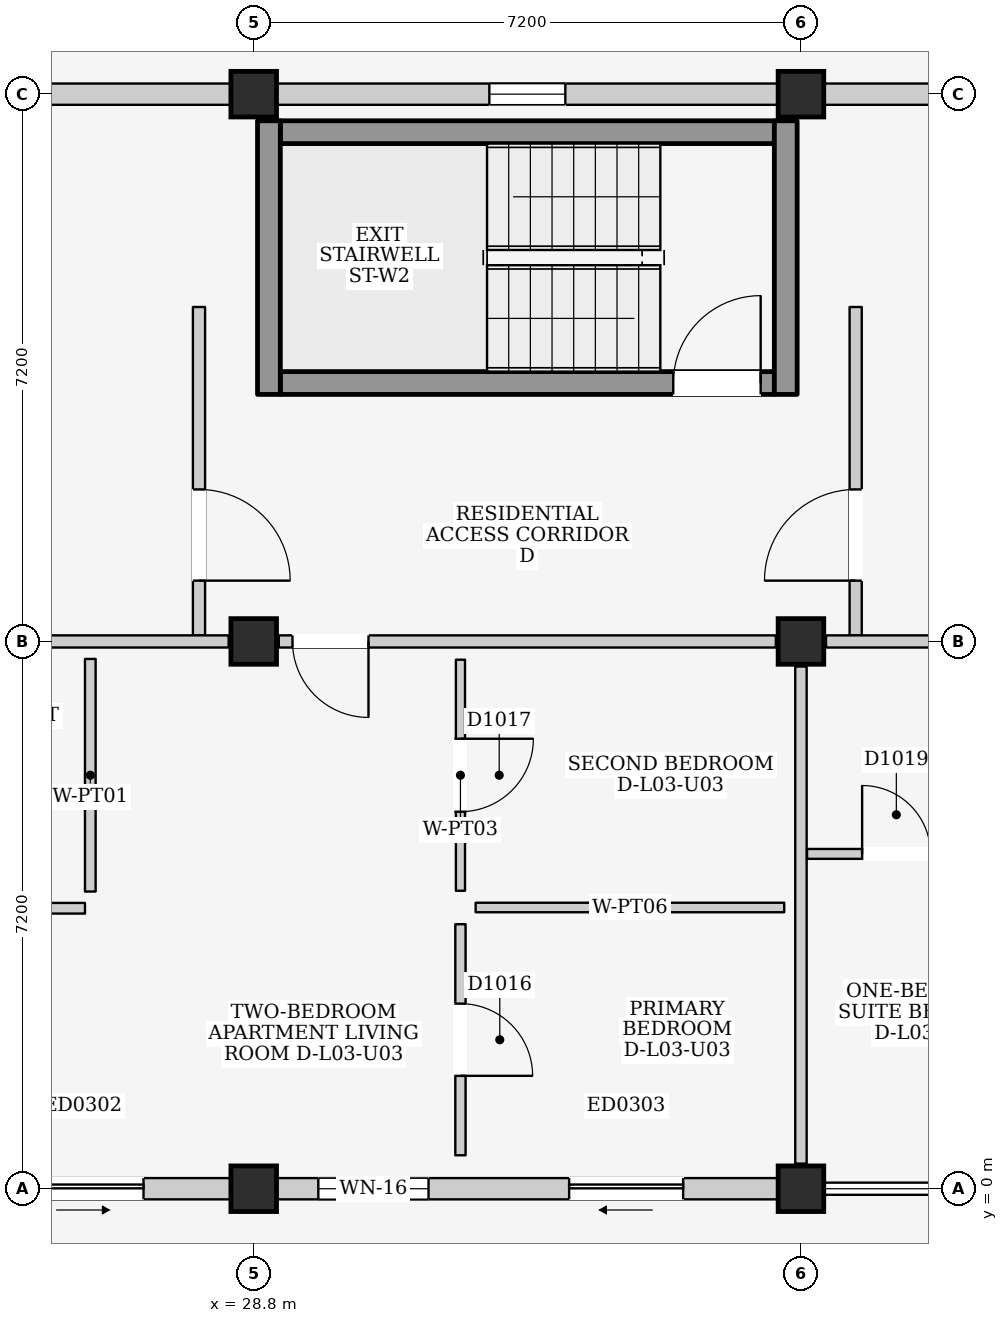
"""IFC4 building model, lengths in metres.
Left out: names, types, materials, properties, quantities, classifications, styles, units other than length and angle.
Written with IfcOpenShell. Run it as: python <this file> out.ifc"""

import sys

from ifc_helpers import new_model, si_unit, direction, frame, frame_2d, origin, origin_2d, place, context, subcontext, project, spatial, rectangle, extrude, element, fill, save


model = new_model("IFC4")
c1 = context("Model", 3, precision=1e-05, world=origin(), true_north=direction((0.0, 1.0)))
c2 = subcontext(c1, "Body", "Model", "MODEL_VIEW")
j1 = project(units=[si_unit("LENGTHUNIT", "METRE"), si_unit("PLANEANGLEUNIT", "RADIAN")], contexts=[c1])
p1 = place(None, origin())
s1 = spatial("IfcSite", under=j1, at=p1, CompositionType="ELEMENT")
p2 = place(p1, origin())
s2 = spatial("IfcBuilding", under=s1, at=p2, CompositionType="ELEMENT")
p3 = place(p2, frame((0.0, 0.0, 12.2)))
s3 = spatial("IfcBuildingStorey", under=s2, at=p3, CompositionType="ELEMENT", Elevation=12.2)
for number, where, z_axis, x_axis in (
    (1, (28.8, 0.0, 0.0), (0.0, 0.0, 1.0), (1.0, 0.0, 0.0)),
    (2, (28.8, 7.2, 0.0), (0.0, 0.0, 1.0), (1.0, 0.0, 0.0)),
    (3, (28.8, 14.4, 0.0), (0.0, 0.0, 1.0), (1.0, 0.0, 0.0)),
    (4, (36.0, 0.0, 0.0), (0.0, 0.0, 1.0), (1.0, 0.0, 0.0)),
    (5, (36.0, 7.2, 0.0), (0.0, 0.0, 1.0), (1.0, 0.0, 0.0)),
    (6, (36.0, 14.4, 0.0), (0.0, 0.0, 1.0), (1.0, 0.0, 0.0)),
):
    element("IfcColumn", number, at=place(p3, frame(where, z_axis=z_axis, x_axis=x_axis)), inside=s3, PredefinedType="COLUMN", context=c2, shape_type="SweptSolid", body=[
        extrude(rectangle(XDim=0.6, YDim=0.6, at=origin_2d()), origin(), (0.0, 0.0, 1.0), 3.2),
    ])
p4 = place(p3, frame((21.9, 0.0, 0.0), z_axis=(0.0, 0.0, 1.0), x_axis=(1.0, 0.0, 0.0)))
e7 = element("IfcWall", 7, at=p4, inside=s3, PredefinedType="ELEMENTEDWALL", context=c2, shape_type="SweptSolid", body=[
    extrude(rectangle(XDim=6.6, YDim=0.28, at=frame_2d((3.3, 0.0))), origin(), (0.0, 0.0, 1.0), 2.445),
])
p5 = place(p4, frame((3.85, 0.0, 0.0)))
e8 = element("IfcOpeningElement", 8, at=p5, cuts=e7, PredefinedType="OPENING", context=c2, shape_type="SweptSolid", body=[
    extrude(rectangle(XDim=1.6, YDim=2.12, at=frame_2d((0.8, 1.06))), frame((0.0, 0.155, 0.0), z_axis=(0.0, -1.0, 0.0), x_axis=(1.0, 0.0, 0.0)), (0.0, 0.0, 1.0), 0.31),
])
p6 = place(p4, frame((0.55, 0.0, 0.885)))
e9 = element("IfcOpeningElement", 9, at=p6, cuts=e7, PredefinedType="OPENING", context=c2, shape_type="SweptSolid", body=[
    extrude(rectangle(XDim=1.7, YDim=1.45, at=frame_2d((0.85, 0.725))), frame((0.0, 0.155, 0.0), z_axis=(0.0, -1.0, 0.0), x_axis=(1.0, 0.0, 0.0)), (0.0, 0.0, 1.0), 0.31),
])
p7 = place(p3, frame((21.9, 14.4, 0.0), z_axis=(0.0, 0.0, 1.0), x_axis=(1.0, 0.0, 0.0)))
e10 = element("IfcWall", 10, at=p7, inside=s3, PredefinedType="ELEMENTEDWALL", context=c2, shape_type="SweptSolid", body=[
    extrude(rectangle(XDim=6.6, YDim=0.28, at=frame_2d((3.3, 0.0))), origin(), (0.0, 0.0, 1.0), 2.365),
])
p8 = place(p7, frame((2.8, 0.0, 1.2)))
e11 = element("IfcOpeningElement", 11, at=p8, cuts=e10, PredefinedType="OPENING", context=c2, shape_type="SweptSolid", body=[
    extrude(rectangle(XDim=1.0, YDim=0.9, at=frame_2d((0.5, 0.45))), frame((0.0, 0.155, 0.0), z_axis=(0.0, -1.0, 0.0), x_axis=(1.0, 0.0, 0.0)), (0.0, 0.0, 1.0), 0.31),
])
p9 = place(p3, frame((29.1, 0.0, 0.0), z_axis=(0.0, 0.0, 1.0), x_axis=(1.0, 0.0, 0.0)))
e12 = element("IfcWall", 12, at=p9, inside=s3, PredefinedType="ELEMENTEDWALL", context=c2, shape_type="SweptSolid", body=[
    extrude(rectangle(XDim=6.6, YDim=0.28, at=frame_2d((3.3, 0.0))), origin(), (0.0, 0.0, 1.0), 2.445),
])
p10 = place(p9, frame((3.85, 0.0, 0.0)))
e13 = element("IfcOpeningElement", 13, at=p10, cuts=e12, PredefinedType="OPENING", context=c2, shape_type="SweptSolid", body=[
    extrude(rectangle(XDim=1.5, YDim=2.12, at=frame_2d((0.75, 1.06))), frame((0.0, 0.155, 0.0), z_axis=(0.0, -1.0, 0.0), x_axis=(1.0, 0.0, 0.0)), (0.0, 0.0, 1.0), 0.31),
])
p11 = place(p9, frame((0.55, 0.0, 0.9)))
e14 = element("IfcOpeningElement", 14, at=p11, cuts=e12, PredefinedType="OPENING", context=c2, shape_type="SweptSolid", body=[
    extrude(rectangle(XDim=1.45, YDim=1.4, at=frame_2d((0.725, 0.7))), frame((0.0, 0.155, 0.0), z_axis=(0.0, -1.0, 0.0), x_axis=(1.0, 0.0, 0.0)), (0.0, 0.0, 1.0), 0.31),
])
p12 = place(p3, frame((29.1, 14.4, 0.0), z_axis=(0.0, 0.0, 1.0), x_axis=(1.0, 0.0, 0.0)))
e15 = element("IfcWall", 15, at=p12, inside=s3, PredefinedType="ELEMENTEDWALL", context=c2, shape_type="SweptSolid", body=[
    extrude(rectangle(XDim=6.6, YDim=0.28, at=frame_2d((3.3, 0.0))), origin(), (0.0, 0.0, 1.0), 2.365),
])
p13 = place(p12, frame((2.8, 0.0, 1.2)))
e16 = element("IfcOpeningElement", 16, at=p13, cuts=e15, PredefinedType="OPENING", context=c2, shape_type="SweptSolid", body=[
    extrude(rectangle(XDim=1.0, YDim=0.9, at=frame_2d((0.5, 0.45))), frame((0.0, 0.155, 0.0), z_axis=(0.0, -1.0, 0.0), x_axis=(1.0, 0.0, 0.0)), (0.0, 0.0, 1.0), 0.31),
])
p14 = place(p3, frame((36.3, 14.4, 0.0), z_axis=(0.0, 0.0, 1.0), x_axis=(1.0, 0.0, 0.0)))
e17 = element("IfcWall", 17, at=p14, inside=s3, PredefinedType="ELEMENTEDWALL", context=c2, shape_type="SweptSolid", body=[
    extrude(rectangle(XDim=6.6, YDim=0.28, at=frame_2d((3.3, 0.0))), origin(), (0.0, 0.0, 1.0), 2.365),
])
p15 = place(p14, frame((2.8, 0.0, 1.2)))
e18 = element("IfcOpeningElement", 18, at=p15, cuts=e17, PredefinedType="OPENING", context=c2, shape_type="SweptSolid", body=[
    extrude(rectangle(XDim=1.0, YDim=0.9, at=frame_2d((0.5, 0.45))), frame((0.0, 0.155, 0.0), z_axis=(0.0, -1.0, 0.0), x_axis=(1.0, 0.0, 0.0)), (0.0, 0.0, 1.0), 0.31),
])
p16 = place(p3, frame((28.08, 7.28, 0.0), z_axis=(0.0, 0.0, 1.0), x_axis=(0.0, 1.0, 0.0)))
e19 = element("IfcWall", 19, at=p16, inside=s3, PredefinedType="PARTITIONING", context=c2, shape_type="SweptSolid", body=[
    extrude(rectangle(XDim=4.32, YDim=0.16, at=frame_2d((2.16, 0.0))), origin(), (0.0, 0.0, 1.0), 2.98),
])
p17 = place(p16, frame((0.72, 0.0, 0.0)))
e20 = element("IfcOpeningElement", 20, at=p17, cuts=e19, PredefinedType="OPENING", context=c2, shape_type="SweptSolid", body=[
    extrude(rectangle(XDim=1.2, YDim=2.2, at=frame_2d((0.6, 1.1))), frame((0.0, 0.095, 0.0), z_axis=(0.0, -1.0, 0.0), x_axis=(1.0, 0.0, 0.0)), (0.0, 0.0, 1.0), 0.19),
])
p18 = place(p3, frame((29.15, 10.6, 0.0), z_axis=(0.0, 0.0, 1.0), x_axis=(1.0, 0.0, 0.0)))
e21 = element("IfcWall", 21, at=p18, inside=s3, PredefinedType="SHEAR", context=c2, shape_type="SweptSolid", body=[
    extrude(rectangle(XDim=6.5, YDim=0.3, at=frame_2d((3.25, 0.0))), origin(), (0.0, 0.0, 1.0), 2.98),
])
p19 = place(p18, frame((5.17, 0.0, 0.0)))
e22 = element("IfcOpeningElement", 22, at=p19, cuts=e21, PredefinedType="OPENING", context=c2, shape_type="SweptSolid", body=[
    extrude(rectangle(XDim=1.15, YDim=2.2, at=frame_2d((0.575, 1.1))), frame((0.0, 0.165, 0.0), z_axis=(0.0, -1.0, 0.0), x_axis=(1.0, 0.0, 0.0)), (0.0, 0.0, 1.0), 0.33),
])
p20 = place(p3, frame((29.15, 13.9, 0.0), z_axis=(0.0, 0.0, 1.0), x_axis=(1.0, 0.0, 0.0)))
e23 = element("IfcWall", 23, at=p20, inside=s3, PredefinedType="SHEAR", context=c2, shape_type="SweptSolid", body=[
    extrude(rectangle(XDim=6.5, YDim=0.3, at=frame_2d((3.25, 0.0))), origin(), (0.0, 0.0, 1.0), 2.98),
])
for number, where, z_axis, x_axis in (
    (24, (29.0, 10.45, 0.0), (0.0, 0.0, 1.0), (0.0, 1.0, 0.0)),
    (25, (35.8, 10.45, 0.0), (0.0, 0.0, 1.0), (0.0, 1.0, 0.0)),
):
    element("IfcWall", number, at=place(p3, frame(where, z_axis=z_axis, x_axis=x_axis)), inside=s3, PredefinedType="SHEAR", context=c2, shape_type="SweptSolid", body=[
        extrude(rectangle(XDim=3.6, YDim=0.3, at=frame_2d((1.8, 0.0))), origin(), (0.0, 0.0, 1.0), 2.98),
    ])
p21 = place(p3, frame((36.72, 7.28, 0.0), z_axis=(0.0, 0.0, 1.0), x_axis=(0.0, 1.0, 0.0)))
e26 = element("IfcWall", 26, at=p21, inside=s3, PredefinedType="PARTITIONING", context=c2, shape_type="SweptSolid", body=[
    extrude(rectangle(XDim=4.32, YDim=0.16, at=frame_2d((2.16, 0.0))), origin(), (0.0, 0.0, 1.0), 2.98),
])
p22 = place(p21, frame((0.72, 0.0, 0.0)))
e27 = element("IfcOpeningElement", 27, at=p22, cuts=e26, PredefinedType="OPENING", context=c2, shape_type="SweptSolid", body=[
    extrude(rectangle(XDim=1.2, YDim=2.2, at=frame_2d((0.6, 1.1))), frame((0.0, 0.095, 0.0), z_axis=(0.0, -1.0, 0.0), x_axis=(1.0, 0.0, 0.0)), (0.0, 0.0, 1.0), 0.19),
])
p23 = place(p3, frame((21.93, 7.2, 0.0), z_axis=(0.0, 0.0, 1.0), x_axis=(1.0, 0.0, 0.0)))
e28 = element("IfcWall", 28, at=p23, inside=s3, PredefinedType="PARTITIONING", context=c2, shape_type="SweptSolid", body=[
    extrude(rectangle(XDim=6.54, YDim=0.16, at=frame_2d((3.27, 0.0))), origin(), (0.0, 0.0, 1.0), 2.365),
])
p24 = place(p3, frame((29.13, 7.2, 0.0), z_axis=(0.0, 0.0, 1.0), x_axis=(1.0, 0.0, 0.0)))
e29 = element("IfcWall", 29, at=p24, inside=s3, PredefinedType="PARTITIONING", context=c2, shape_type="SweptSolid", body=[
    extrude(rectangle(XDim=6.54, YDim=0.16, at=frame_2d((3.27, 0.0))), origin(), (0.0, 0.0, 1.0), 2.365),
])
p25 = place(p24, frame((0.18, 0.0, 0.0)))
e30 = element("IfcOpeningElement", 30, at=p25, cuts=e29, PredefinedType="OPENING", context=c2, shape_type="SweptSolid", body=[
    extrude(rectangle(XDim=1.0, YDim=2.15, at=frame_2d((0.5, 1.075))), frame((0.0, 0.095, 0.0), z_axis=(0.0, -1.0, 0.0), x_axis=(1.0, 0.0, 0.0)), (0.0, 0.0, 1.0), 0.19),
])
p26 = place(p3, frame((36.0, 0.33, 0.0), z_axis=(0.0, 0.0, 1.0), x_axis=(0.0, 1.0, 0.0)))
e31 = element("IfcWall", 31, at=p26, inside=s3, PredefinedType="PARTITIONING", context=c2, shape_type="SweptSolid", body=[
    extrude(rectangle(XDim=6.54, YDim=0.15, at=frame_2d((3.27, 0.0))), origin(), (0.0, 0.0, 1.0), 2.415),
])
p27 = place(p3, frame((24.2, 3.69, 0.0), z_axis=(0.0, 0.0, 1.0), x_axis=(1.0, 0.0, 0.0)))
e32 = element("IfcWall", 32, at=p27, inside=s3, PredefinedType="PARTITIONING", context=c2, shape_type="SweptSolid", body=[
    extrude(rectangle(XDim=2.38, YDim=0.14, at=frame_2d((1.19, 0.0))), origin(), (0.0, 0.0, 1.0), 2.98),
])
p28 = place(p27, frame((0.73, 0.0, 0.0)))
e33 = element("IfcOpeningElement", 33, at=p28, cuts=e32, PredefinedType="OPENING", context=c2, shape_type="SweptSolid", body=[
    extrude(rectangle(XDim=0.92, YDim=2.1, at=frame_2d((0.46, 1.05))), frame((0.0, 0.085, 0.0), z_axis=(0.0, -1.0, 0.0), x_axis=(1.0, 0.0, 0.0)), (0.0, 0.0, 1.0), 0.17),
])
p29 = place(p3, frame((26.65, 3.91, 0.0), z_axis=(0.0, 0.0, 1.0), x_axis=(0.0, 1.0, 0.0)))
e34 = element("IfcWall", 34, at=p29, inside=s3, PredefinedType="PARTITIONING", context=c2, shape_type="SweptSolid", body=[
    extrude(rectangle(XDim=3.06, YDim=0.14, at=frame_2d((1.53, 0.0))), origin(), (0.0, 0.0, 1.0), 2.98),
])
p30 = place(p3, frame((31.52, 0.44, 0.0), z_axis=(0.0, 0.0, 1.0), x_axis=(0.0, 1.0, 0.0)))
e35 = element("IfcWall", 35, at=p30, inside=s3, PredefinedType="PARTITIONING", context=c2, shape_type="SweptSolid", body=[
    extrude(rectangle(XDim=3.04, YDim=0.135, at=frame_2d((1.52, 0.0))), origin(), (0.0, 0.0, 1.0), 2.98),
])
p31 = place(p30, frame((1.045, 0.0, 0.0)))
e36 = element("IfcOpeningElement", 36, at=p31, cuts=e35, PredefinedType="OPENING", context=c2, shape_type="SweptSolid", body=[
    extrude(rectangle(XDim=0.95, YDim=2.15, at=frame_2d((0.475, 1.075))), frame((0.0, 0.083, 0.0), z_axis=(0.0, -1.0, 0.0), x_axis=(1.0, 0.0, 0.0)), (0.0, 0.0, 1.0), 0.165),
])
p32 = place(p3, frame((31.72, 3.7, 0.0), z_axis=(0.0, 0.0, 1.0), x_axis=(1.0, 0.0, 0.0)))
e37 = element("IfcWall", 37, at=p32, inside=s3, PredefinedType="PARTITIONING", context=c2, shape_type="SweptSolid", body=[
    extrude(rectangle(XDim=4.06, YDim=0.125, at=frame_2d((2.03, 0.0))), origin(), (0.0, 0.0, 1.0), 2.98),
])
p33 = place(p3, frame((31.52, 3.92, 0.0), z_axis=(0.0, 0.0, 1.0), x_axis=(0.0, 1.0, 0.0)))
e38 = element("IfcWall", 38, at=p33, inside=s3, PredefinedType="PARTITIONING", context=c2, shape_type="SweptSolid", body=[
    extrude(rectangle(XDim=3.04, YDim=0.12, at=frame_2d((1.52, 0.0))), origin(), (0.0, 0.0, 1.0), 2.98),
])
p34 = place(p33, frame((1.04, 0.0, 0.0)))
e39 = element("IfcOpeningElement", 39, at=p34, cuts=e38, PredefinedType="OPENING", context=c2, shape_type="SweptSolid", body=[
    extrude(rectangle(XDim=0.96, YDim=2.15, at=frame_2d((0.48, 1.075))), frame((0.0, 0.075, 0.0), z_axis=(0.0, -1.0, 0.0), x_axis=(1.0, 0.0, 0.0)), (0.0, 0.0, 1.0), 0.15),
])
p35 = place(p3, frame((36.33, 7.2, 0.0), z_axis=(0.0, 0.0, 1.0), x_axis=(1.0, 0.0, 0.0)))
e40 = element("IfcWall", 40, at=p35, inside=s3, PredefinedType="PARTITIONING", context=c2, shape_type="SweptSolid", body=[
    extrude(rectangle(XDim=6.54, YDim=0.16, at=frame_2d((3.27, 0.0))), origin(), (0.0, 0.0, 1.0), 2.365),
])
p36 = place(p35, frame((4.32, 0.0, 0.0)))
e41 = element("IfcOpeningElement", 41, at=p36, cuts=e40, PredefinedType="OPENING", context=c2, shape_type="SweptSolid", body=[
    extrude(rectangle(XDim=1.0, YDim=2.15, at=frame_2d((0.5, 1.075))), frame((0.0, 0.095, 0.0), z_axis=(0.0, -1.0, 0.0), x_axis=(1.0, 0.0, 0.0)), (0.0, 0.0, 1.0), 0.19),
])
p37 = place(p3, frame((36.08, 4.405, 0.0), z_axis=(0.0, 0.0, 1.0), x_axis=(1.0, 0.0, 0.0)))
e42 = element("IfcWall", 42, at=p37, inside=s3, PredefinedType="PARTITIONING", context=c2, shape_type="SweptSolid", body=[
    extrude(rectangle(XDim=2.35, YDim=0.13, at=frame_2d((1.175, 0.0))), origin(), (0.0, 0.0, 1.0), 2.98),
])
p38 = place(p37, frame((0.725, 0.0, 0.0)))
e43 = element("IfcOpeningElement", 43, at=p38, cuts=e42, PredefinedType="OPENING", context=c2, shape_type="SweptSolid", body=[
    extrude(rectangle(XDim=0.9, YDim=2.1, at=frame_2d((0.45, 1.05))), frame((0.0, 0.08, 0.0), z_axis=(0.0, -1.0, 0.0), x_axis=(1.0, 0.0, 0.0)), (0.0, 0.0, 1.0), 0.16),
])
p39 = place(p5, frame((1.6, 0.0, 0.0), z_axis=(0.0, 0.0, 1.0), x_axis=(-1.0, 0.0, 0.0)))
e44 = element("IfcDoor", 44, at=p39, inside=s3, OperationType="SLIDING_TO_RIGHT", PredefinedType="DOOR", context=c2, shape_type="SweptSolid", body=[
    extrude(rectangle(XDim=1.6, YDim=2.12, at=frame_2d((0.8, 1.06))), frame((0.0, 0.025, 0.0), z_axis=(0.0, -1.0, 0.0), x_axis=(1.0, 0.0, 0.0)), (0.0, 0.0, 1.0), 0.05),
])
fill(e8, e44)
p40 = place(p10, frame((1.5, 0.0, 0.0), z_axis=(0.0, 0.0, 1.0), x_axis=(-1.0, 0.0, 0.0)))
e45 = element("IfcDoor", 45, at=p40, inside=s3, OperationType="SLIDING_TO_LEFT", PredefinedType="DOOR", context=c2, shape_type="SweptSolid", body=[
    extrude(rectangle(XDim=1.5, YDim=2.12, at=frame_2d((0.75, 1.06))), frame((0.0, 0.025, 0.0), z_axis=(0.0, -1.0, 0.0), x_axis=(1.0, 0.0, 0.0)), (0.0, 0.0, 1.0), 0.05),
])
fill(e13, e45)
p41 = place(p11, origin())
e46 = element("IfcWindow", 46, at=p41, inside=s3, PartitioningType="DOUBLE_PANEL_VERTICAL", PredefinedType="WINDOW", context=c2, shape_type="SweptSolid", body=[
    extrude(rectangle(XDim=1.45, YDim=1.4, at=frame_2d((0.725, 0.7))), frame((0.0, 0.03, 0.0), z_axis=(0.0, -1.0, 0.0), x_axis=(1.0, 0.0, 0.0)), (0.0, 0.0, 1.0), 0.06),
])
fill(e14, e46)
p42 = place(p13, origin())
e47 = element("IfcWindow", 47, at=p42, inside=s3, PartitioningType="SINGLE_PANEL", PredefinedType="WINDOW", context=c2, shape_type="SweptSolid", body=[
    extrude(rectangle(XDim=1.0, YDim=0.9, at=frame_2d((0.5, 0.45))), frame((0.0, 0.03, 0.0), z_axis=(0.0, -1.0, 0.0), x_axis=(1.0, 0.0, 0.0)), (0.0, 0.0, 1.0), 0.06),
])
fill(e16, e47)
p43 = place(p17, frame((1.2, 0.0, 0.0), z_axis=(0.0, 0.0, 1.0), x_axis=(-1.0, 0.0, 0.0)))
e48 = element("IfcDoor", 48, at=p43, inside=s3, OperationType="SINGLE_SWING_RIGHT", PredefinedType="DOOR", context=c2, shape_type="SweptSolid", body=[
    extrude(rectangle(XDim=1.2, YDim=2.2, at=frame_2d((0.6, 1.1))), frame((0.0, 0.025, 0.0), z_axis=(0.0, -1.0, 0.0), x_axis=(1.0, 0.0, 0.0)), (0.0, 0.0, 1.0), 0.05),
])
fill(e20, e48)
p44 = place(p19, origin())
e49 = element("IfcDoor", 49, at=p44, inside=s3, OperationType="SINGLE_SWING_RIGHT", PredefinedType="DOOR", context=c2, shape_type="SweptSolid", body=[
    extrude(rectangle(XDim=1.15, YDim=2.2, at=frame_2d((0.575, 1.1))), frame((0.0, 0.025, 0.0), z_axis=(0.0, -1.0, 0.0), x_axis=(1.0, 0.0, 0.0)), (0.0, 0.0, 1.0), 0.05),
])
fill(e22, e49)
p45 = place(p22, origin())
e50 = element("IfcDoor", 50, at=p45, inside=s3, OperationType="SINGLE_SWING_LEFT", PredefinedType="DOOR", context=c2, shape_type="SweptSolid", body=[
    extrude(rectangle(XDim=1.2, YDim=2.2, at=frame_2d((0.6, 1.1))), frame((0.0, 0.025, 0.0), z_axis=(0.0, -1.0, 0.0), x_axis=(1.0, 0.0, 0.0)), (0.0, 0.0, 1.0), 0.05),
])
fill(e27, e50)
p46 = place(p25, frame((1.0, 0.0, 0.0), z_axis=(0.0, 0.0, 1.0), x_axis=(-1.0, 0.0, 0.0)))
e51 = element("IfcDoor", 51, at=p46, inside=s3, OperationType="SINGLE_SWING_LEFT", PredefinedType="DOOR", context=c2, shape_type="SweptSolid", body=[
    extrude(rectangle(XDim=1.0, YDim=2.15, at=frame_2d((0.5, 1.075))), frame((0.0, 0.025, 0.0), z_axis=(0.0, -1.0, 0.0), x_axis=(1.0, 0.0, 0.0)), (0.0, 0.0, 1.0), 0.05),
])
fill(e30, e51)
p47 = place(p31, frame((0.95, 0.0, 0.0), z_axis=(0.0, 0.0, 1.0), x_axis=(-1.0, 0.0, 0.0)))
e52 = element("IfcDoor", 52, at=p47, inside=s3, OperationType="SINGLE_SWING_RIGHT", PredefinedType="DOOR", context=c2, shape_type="SweptSolid", body=[
    extrude(rectangle(XDim=0.95, YDim=2.15, at=frame_2d((0.475, 1.075))), frame((0.0, 0.025, 0.0), z_axis=(0.0, -1.0, 0.0), x_axis=(1.0, 0.0, 0.0)), (0.0, 0.0, 1.0), 0.05),
])
fill(e36, e52)
p48 = place(p34, frame((0.96, 0.0, 0.0), z_axis=(0.0, 0.0, 1.0), x_axis=(-1.0, 0.0, 0.0)))
e53 = element("IfcDoor", 53, at=p48, inside=s3, OperationType="SINGLE_SWING_LEFT", PredefinedType="DOOR", context=c2, shape_type="SweptSolid", body=[
    extrude(rectangle(XDim=0.96, YDim=2.15, at=frame_2d((0.48, 1.075))), frame((0.0, 0.025, 0.0), z_axis=(0.0, -1.0, 0.0), x_axis=(1.0, 0.0, 0.0)), (0.0, 0.0, 1.0), 0.05),
])
fill(e39, e53)
p49 = place(p38, origin())
e54 = element("IfcDoor", 54, at=p49, inside=s3, OperationType="SINGLE_SWING_LEFT", PredefinedType="DOOR", context=c2, shape_type="SweptSolid", body=[
    extrude(rectangle(XDim=0.9, YDim=2.1, at=frame_2d((0.45, 1.05))), frame((0.0, 0.025, 0.0), z_axis=(0.0, -1.0, 0.0), x_axis=(1.0, 0.0, 0.0)), (0.0, 0.0, 1.0), 0.05),
])
fill(e43, e54)
save(model, sys.argv[1])
